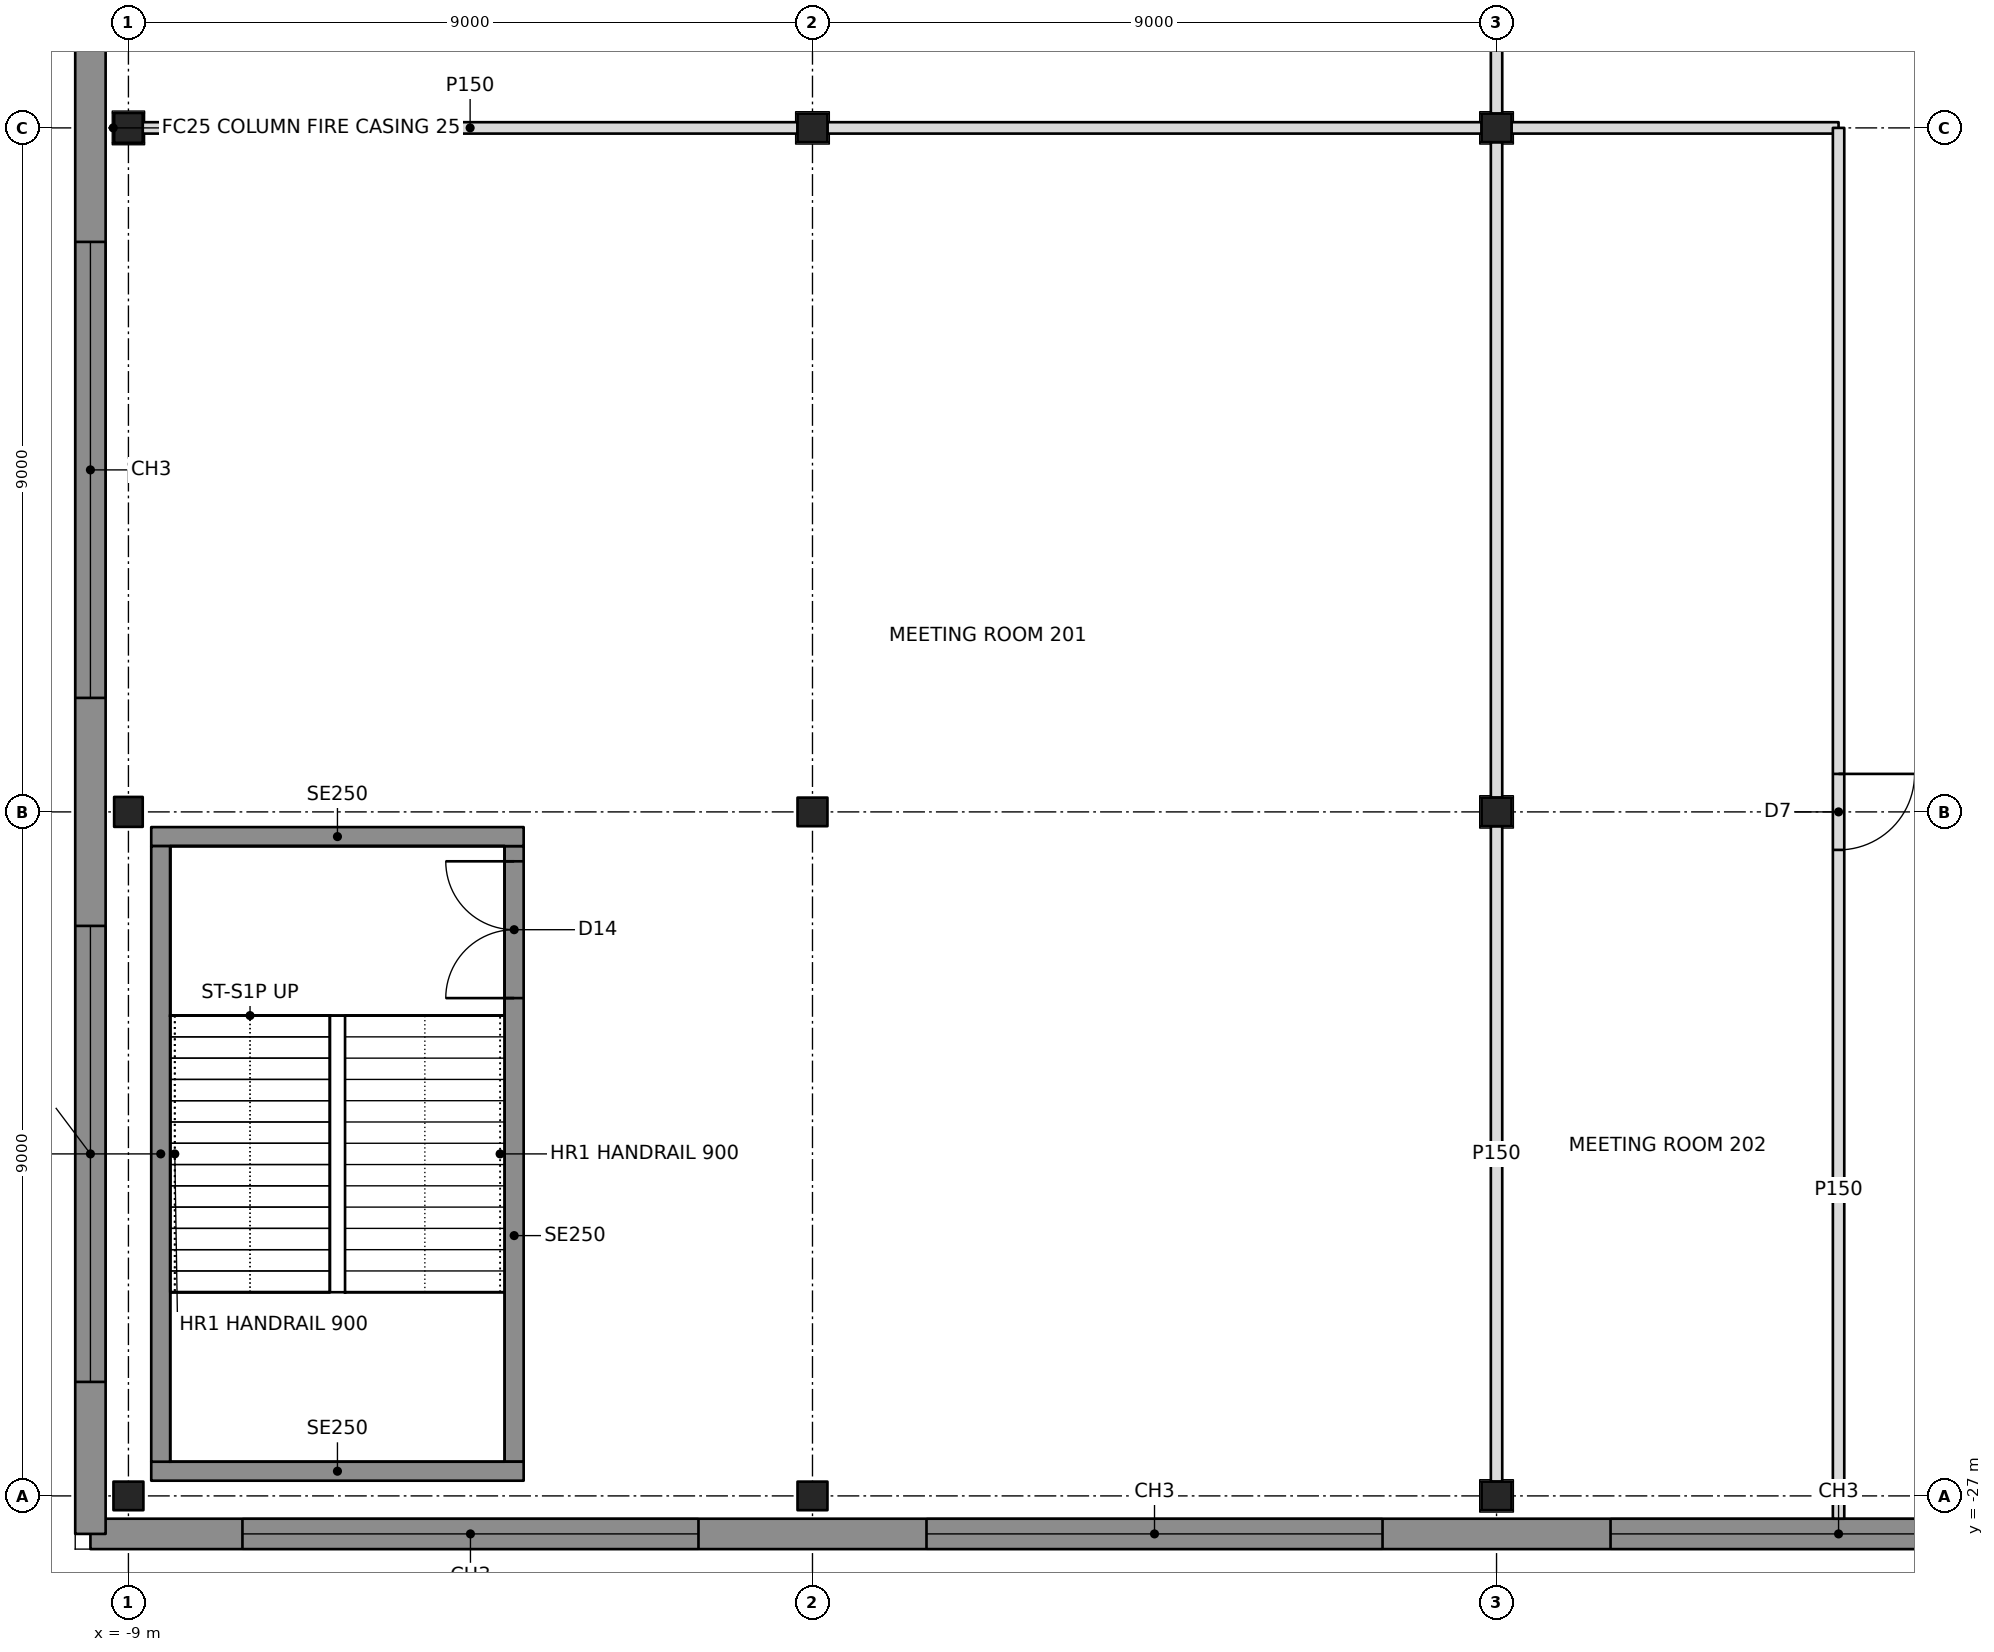
"""IFC4 building model, lengths in metres.
Left out: names, types, materials, properties, quantities, classifications, styles, units other than length and angle.
Written with IfcOpenShell. Run it as: python <this file> out.ifc"""

import sys

from ifc_helpers import new_model, si_unit, direction, frame, frame_2d, origin, origin_2d, place, context, subcontext, project, spatial, rectangle, i_section, extrude, element, fill, save


model = new_model("IFC4")
c1 = context("Model", 3, precision=1e-05, world=origin(), true_north=direction((0.0, 1.0)))
c2 = subcontext(c1, "Body", "Model", "MODEL_VIEW")
j1 = project(units=[si_unit("LENGTHUNIT", "METRE"), si_unit("PLANEANGLEUNIT", "RADIAN")], contexts=[c1])
p1 = place(None, origin())
s1 = spatial("IfcSite", under=j1, at=p1, CompositionType="ELEMENT")
p2 = place(p1, origin())
s2 = spatial("IfcBuilding", under=s1, at=p2, CompositionType="ELEMENT")
p3 = place(p2, frame((0.0, 0.0, 11.0)))
s3 = spatial("IfcBuildingStorey", under=s2, at=p3, CompositionType="ELEMENT", Elevation=11.0)
for number, where, z_axis, x_axis in (
    (1, (-9.0, -27.0, 0.0), (0.0, 0.0, 1.0), (1.0, 0.0, 0.0)),
    (2, (-9.0, -18.0, 0.0), (0.0, 0.0, 1.0), (0.0, 1.0, 0.0)),
    (3, (-9.0, -9.0, 0.0), (0.0, 0.0, 1.0), (0.0, 1.0, 0.0)),
    (4, (0.0, -27.0, 0.0), (0.0, 0.0, 1.0), (1.0, 0.0, 0.0)),
    (5, (0.0, -18.0, 0.0), (0.0, 0.0, 1.0), (1.0, 0.0, 0.0)),
    (6, (0.0, -9.0, 0.0), (0.0, 0.0, 1.0), (1.0, 0.0, 0.0)),
    (7, (9.0, -27.0, 0.0), (0.0, 0.0, 1.0), (1.0, 0.0, 0.0)),
    (8, (9.0, -18.0, 0.0), (0.0, 0.0, 1.0), (1.0, 0.0, 0.0)),
    (9, (9.0, -9.0, 0.0), (0.0, 0.0, 1.0), (1.0, 0.0, 0.0)),
):
    element("IfcColumn", number, at=place(p3, frame(where, z_axis=z_axis, x_axis=x_axis)), inside=s3, PredefinedType="COLUMN", context=c2, shape_type="SweptSolid", body=[
        extrude(i_section(OverallWidth=0.394, OverallDepth=0.376, WebThickness=0.017, FlangeThickness=0.028, at=origin_2d()), origin(), (0.0, 0.0, 1.0), 5.0),
    ])
p4 = place(p3, frame((-9.5, -27.5, 0.0), z_axis=(0.0, 0.0, 1.0), x_axis=(1.0, 0.0, 0.0)))
e10 = element("IfcWall", 10, at=p4, inside=s3, PredefinedType="SOLIDWALL", context=c2, shape_type="SweptSolid", body=[
    extrude(rectangle(XDim=73.0, YDim=0.4, at=frame_2d((36.5, 0.0))), origin(), (0.0, 0.0, 1.0), 4.75),
])
p5 = place(p4, frame((2.0, 0.0, 0.9)))
e11 = element("IfcOpeningElement", 11, at=p5, cuts=e10, PredefinedType="OPENING", context=c2, shape_type="SweptSolid", body=[
    extrude(rectangle(XDim=6.0, YDim=2.6, at=frame_2d((3.0, 1.3))), frame((0.0, 0.21, 0.0), z_axis=(0.0, -1.0, 0.0), x_axis=(1.0, 0.0, 0.0)), (0.0, 0.0, 1.0), 0.42),
])
p6 = place(p4, frame((11.0, 0.0, 0.9)))
e12 = element("IfcOpeningElement", 12, at=p6, cuts=e10, PredefinedType="OPENING", context=c2, shape_type="SweptSolid", body=[
    extrude(rectangle(XDim=6.0, YDim=2.6, at=frame_2d((3.0, 1.3))), frame((0.0, 0.21, 0.0), z_axis=(0.0, -1.0, 0.0), x_axis=(1.0, 0.0, 0.0)), (0.0, 0.0, 1.0), 0.42),
])
p7 = place(p4, frame((20.0, 0.0, 0.9)))
e13 = element("IfcOpeningElement", 13, at=p7, cuts=e10, PredefinedType="OPENING", context=c2, shape_type="SweptSolid", body=[
    extrude(rectangle(XDim=6.0, YDim=2.6, at=frame_2d((3.0, 1.3))), frame((0.0, 0.21, 0.0), z_axis=(0.0, -1.0, 0.0), x_axis=(1.0, 0.0, 0.0)), (0.0, 0.0, 1.0), 0.42),
])
p8 = place(p4, frame((29.0, 0.0, 0.9)))
e14 = element("IfcOpeningElement", 14, at=p8, cuts=e10, PredefinedType="OPENING", context=c2, shape_type="SweptSolid", body=[
    extrude(rectangle(XDim=6.0, YDim=2.6, at=frame_2d((3.0, 1.3))), frame((0.0, 0.21, 0.0), z_axis=(0.0, -1.0, 0.0), x_axis=(1.0, 0.0, 0.0)), (0.0, 0.0, 1.0), 0.42),
])
p9 = place(p4, frame((38.0, 0.0, 0.9)))
e15 = element("IfcOpeningElement", 15, at=p9, cuts=e10, PredefinedType="OPENING", context=c2, shape_type="SweptSolid", body=[
    extrude(rectangle(XDim=6.0, YDim=2.6, at=frame_2d((3.0, 1.3))), frame((0.0, 0.21, 0.0), z_axis=(0.0, -1.0, 0.0), x_axis=(1.0, 0.0, 0.0)), (0.0, 0.0, 1.0), 0.42),
])
p10 = place(p4, frame((47.0, 0.0, 0.9)))
e16 = element("IfcOpeningElement", 16, at=p10, cuts=e10, PredefinedType="OPENING", context=c2, shape_type="SweptSolid", body=[
    extrude(rectangle(XDim=6.0, YDim=2.6, at=frame_2d((3.0, 1.3))), frame((0.0, 0.21, 0.0), z_axis=(0.0, -1.0, 0.0), x_axis=(1.0, 0.0, 0.0)), (0.0, 0.0, 1.0), 0.42),
])
p11 = place(p4, frame((56.0, 0.0, 0.9)))
e17 = element("IfcOpeningElement", 17, at=p11, cuts=e10, PredefinedType="OPENING", context=c2, shape_type="SweptSolid", body=[
    extrude(rectangle(XDim=6.0, YDim=2.6, at=frame_2d((3.0, 1.3))), frame((0.0, 0.21, 0.0), z_axis=(0.0, -1.0, 0.0), x_axis=(1.0, 0.0, 0.0)), (0.0, 0.0, 1.0), 0.42),
])
p12 = place(p4, frame((65.0, 0.0, 0.9)))
e18 = element("IfcOpeningElement", 18, at=p12, cuts=e10, PredefinedType="OPENING", context=c2, shape_type="SweptSolid", body=[
    extrude(rectangle(XDim=6.0, YDim=2.6, at=frame_2d((3.0, 1.3))), frame((0.0, 0.21, 0.0), z_axis=(0.0, -1.0, 0.0), x_axis=(1.0, 0.0, 0.0)), (0.0, 0.0, 1.0), 0.42),
])
p13 = place(p3, frame((-9.5, 45.5, 0.0), z_axis=(0.0, 0.0, 1.0), x_axis=(0.0, -1.0, 0.0)))
e19 = element("IfcWall", 19, at=p13, inside=s3, PredefinedType="SOLIDWALL", context=c2, shape_type="SweptSolid", body=[
    extrude(rectangle(XDim=73.0, YDim=0.4, at=frame_2d((36.5, 0.0))), origin(), (0.0, 0.0, 1.0), 4.75),
])
p14 = place(p13, frame((2.0, 0.0, 0.9)))
e20 = element("IfcOpeningElement", 20, at=p14, cuts=e19, PredefinedType="OPENING", context=c2, shape_type="SweptSolid", body=[
    extrude(rectangle(XDim=6.0, YDim=2.6, at=frame_2d((3.0, 1.3))), frame((0.0, 0.21, 0.0), z_axis=(0.0, -1.0, 0.0), x_axis=(1.0, 0.0, 0.0)), (0.0, 0.0, 1.0), 0.42),
])
p15 = place(p13, frame((11.0, 0.0, 0.9)))
e21 = element("IfcOpeningElement", 21, at=p15, cuts=e19, PredefinedType="OPENING", context=c2, shape_type="SweptSolid", body=[
    extrude(rectangle(XDim=6.0, YDim=2.6, at=frame_2d((3.0, 1.3))), frame((0.0, 0.21, 0.0), z_axis=(0.0, -1.0, 0.0), x_axis=(1.0, 0.0, 0.0)), (0.0, 0.0, 1.0), 0.42),
])
p16 = place(p13, frame((20.0, 0.0, 0.9)))
e22 = element("IfcOpeningElement", 22, at=p16, cuts=e19, PredefinedType="OPENING", context=c2, shape_type="SweptSolid", body=[
    extrude(rectangle(XDim=6.0, YDim=2.6, at=frame_2d((3.0, 1.3))), frame((0.0, 0.21, 0.0), z_axis=(0.0, -1.0, 0.0), x_axis=(1.0, 0.0, 0.0)), (0.0, 0.0, 1.0), 0.42),
])
p17 = place(p13, frame((29.0, 0.0, 0.9)))
e23 = element("IfcOpeningElement", 23, at=p17, cuts=e19, PredefinedType="OPENING", context=c2, shape_type="SweptSolid", body=[
    extrude(rectangle(XDim=6.0, YDim=2.6, at=frame_2d((3.0, 1.3))), frame((0.0, 0.21, 0.0), z_axis=(0.0, -1.0, 0.0), x_axis=(1.0, 0.0, 0.0)), (0.0, 0.0, 1.0), 0.42),
])
p18 = place(p13, frame((38.0, 0.0, 0.9)))
e24 = element("IfcOpeningElement", 24, at=p18, cuts=e19, PredefinedType="OPENING", context=c2, shape_type="SweptSolid", body=[
    extrude(rectangle(XDim=6.0, YDim=2.6, at=frame_2d((3.0, 1.3))), frame((0.0, 0.21, 0.0), z_axis=(0.0, -1.0, 0.0), x_axis=(1.0, 0.0, 0.0)), (0.0, 0.0, 1.0), 0.42),
])
p19 = place(p13, frame((47.0, 0.0, 0.9)))
e25 = element("IfcOpeningElement", 25, at=p19, cuts=e19, PredefinedType="OPENING", context=c2, shape_type="SweptSolid", body=[
    extrude(rectangle(XDim=6.0, YDim=2.6, at=frame_2d((3.0, 1.3))), frame((0.0, 0.21, 0.0), z_axis=(0.0, -1.0, 0.0), x_axis=(1.0, 0.0, 0.0)), (0.0, 0.0, 1.0), 0.42),
])
p20 = place(p13, frame((56.0, 0.0, 0.9)))
e26 = element("IfcOpeningElement", 26, at=p20, cuts=e19, PredefinedType="OPENING", context=c2, shape_type="SweptSolid", body=[
    extrude(rectangle(XDim=6.0, YDim=2.6, at=frame_2d((3.0, 1.3))), frame((0.0, 0.21, 0.0), z_axis=(0.0, -1.0, 0.0), x_axis=(1.0, 0.0, 0.0)), (0.0, 0.0, 1.0), 0.42),
])
p21 = place(p13, frame((65.0, 0.0, 0.9)))
e27 = element("IfcOpeningElement", 27, at=p21, cuts=e19, PredefinedType="OPENING", context=c2, shape_type="SweptSolid", body=[
    extrude(rectangle(XDim=6.0, YDim=2.6, at=frame_2d((3.0, 1.3))), frame((0.0, 0.21, 0.0), z_axis=(0.0, -1.0, 0.0), x_axis=(1.0, 0.0, 0.0)), (0.0, 0.0, 1.0), 0.42),
])
p22 = place(p3, frame((-8.812, -9.0, 0.0), z_axis=(0.0, 0.0, 1.0), x_axis=(1.0, 0.0, 0.0)))
e28 = element("IfcWall", 28, at=p22, inside=s3, PredefinedType="PARTITIONING", context=c2, shape_type="SweptSolid", body=[
    extrude(rectangle(XDim=8.615, YDim=0.15, at=frame_2d((4.308, 0.0))), origin(), (0.0, 0.0, 1.0), 3.892),
])
p23 = place(p3, frame((0.197, -9.0, 0.0), z_axis=(0.0, 0.0, 1.0), x_axis=(1.0, 0.0, 0.0)))
e29 = element("IfcWall", 29, at=p23, inside=s3, PredefinedType="PARTITIONING", context=c2, shape_type="SweptSolid", body=[
    extrude(rectangle(XDim=8.606, YDim=0.15, at=frame_2d((4.303, 0.0))), origin(), (0.0, 0.0, 1.0), 3.892),
])
for number, where, z_axis, x_axis in (
    (30, (9.0, -9.188, 0.0), (0.0, 0.0, 1.0), (0.0, -1.0, 0.0)),
    (31, (9.0, -18.188, 0.0), (0.0, 0.0, 1.0), (0.0, -1.0, 0.0)),
):
    element("IfcWall", number, at=place(p3, frame(where, z_axis=z_axis, x_axis=x_axis)), inside=s3, PredefinedType="PARTITIONING", context=c2, shape_type="SweptSolid", body=[
        extrude(rectangle(XDim=8.624, YDim=0.15, at=frame_2d((4.312, 0.0))), origin(), (0.0, 0.0, 1.0), 3.892),
    ])
p24 = place(p3, frame((9.197, -9.0, 0.0), z_axis=(0.0, 0.0, 1.0), x_axis=(1.0, 0.0, 0.0)))
e32 = element("IfcWall", 32, at=p24, inside=s3, PredefinedType="PARTITIONING", context=c2, shape_type="SweptSolid", body=[
    extrude(rectangle(XDim=4.303, YDim=0.15, at=frame_2d((2.152, 0.0))), origin(), (0.0, 0.0, 1.0), 3.892),
])
p25 = place(p3, frame((9.0, -0.4, 0.0), z_axis=(0.0, 0.0, 1.0), x_axis=(0.0, -1.0, 0.0)))
e33 = element("IfcWall", 33, at=p25, inside=s3, PredefinedType="PARTITIONING", context=c2, shape_type="SweptSolid", body=[
    extrude(rectangle(XDim=8.412, YDim=0.15, at=frame_2d((4.206, 0.0))), origin(), (0.0, 0.0, 1.0), 3.892),
])
p26 = place(p3, frame((13.5, -9.0, 0.0), z_axis=(0.0, 0.0, 1.0), x_axis=(0.0, -1.0, 0.0)))
e34 = element("IfcWall", 34, at=p26, inside=s3, PredefinedType="PARTITIONING", context=c2, shape_type="SweptSolid", body=[
    extrude(rectangle(XDim=18.3, YDim=0.15, at=frame_2d((9.15, 0.0))), origin(), (0.0, 0.0, 1.0), 3.891),
])
p27 = place(p26, frame((8.5, 0.0, 0.0)))
e35 = element("IfcOpeningElement", 35, at=p27, cuts=e34, PredefinedType="OPENING", context=c2, shape_type="SweptSolid", body=[
    extrude(rectangle(XDim=1.0, YDim=2.1, at=frame_2d((0.5, 1.05))), frame((0.0, 0.085, 0.0), z_axis=(0.0, -1.0, 0.0), x_axis=(1.0, 0.0, 0.0)), (0.0, 0.0, 1.0), 0.17),
])
for number, where, z_axis, x_axis in (
    (36, (-8.7, -26.675, 0.0), (0.0, 0.0, 1.0), (1.0, 0.0, 0.0)),
    (37, (-8.7, -18.325, 0.0), (0.0, 0.0, 1.0), (1.0, 0.0, 0.0)),
):
    element("IfcWall", number, at=place(p3, frame(where, z_axis=z_axis, x_axis=x_axis)), inside=s3, PredefinedType="SOLIDWALL", context=c2, shape_type="SweptSolid", body=[
        extrude(rectangle(XDim=4.9, YDim=0.25, at=frame_2d((2.45, 0.0))), origin(), (0.0, 0.0, 1.0), 4.75),
    ])
p28 = place(p3, frame((-8.575, -26.55, 0.0), z_axis=(0.0, 0.0, 1.0), x_axis=(0.0, 1.0, 0.0)))
e38 = element("IfcWall", 38, at=p28, inside=s3, PredefinedType="SOLIDWALL", context=c2, shape_type="SweptSolid", body=[
    extrude(rectangle(XDim=8.1, YDim=0.25, at=frame_2d((4.05, 0.0))), origin(), (0.0, 0.0, 1.0), 4.75),
])
p29 = place(p3, frame((-3.925, -26.55, 0.0), z_axis=(0.0, 0.0, 1.0), x_axis=(0.0, 1.0, 0.0)))
e39 = element("IfcWall", 39, at=p29, inside=s3, PredefinedType="SOLIDWALL", context=c2, shape_type="SweptSolid", body=[
    extrude(rectangle(XDim=8.1, YDim=0.25, at=frame_2d((4.05, 0.0))), origin(), (0.0, 0.0, 1.0), 4.75),
])
p30 = place(p29, frame((6.1, 0.0, 0.0)))
e40 = element("IfcOpeningElement", 40, at=p30, cuts=e39, PredefinedType="OPENING", context=c2, shape_type="SweptSolid", body=[
    extrude(rectangle(XDim=1.8, YDim=2.1, at=frame_2d((0.9, 1.05))), frame((0.0, 0.135, 0.0), z_axis=(0.0, -1.0, 0.0), x_axis=(1.0, 0.0, 0.0)), (0.0, 0.0, 1.0), 0.27),
])
p31 = place(p5, origin())
e41 = element("IfcWindow", 41, at=p31, inside=s3, PartitioningType="TRIPLE_PANEL_VERTICAL", PredefinedType="WINDOW", context=c2, shape_type="SweptSolid", body=[
    extrude(rectangle(XDim=6.0, YDim=2.6, at=frame_2d((3.0, 1.3))), frame((0.0, 0.03, 0.0), z_axis=(0.0, -1.0, 0.0), x_axis=(1.0, 0.0, 0.0)), (0.0, 0.0, 1.0), 0.06),
])
fill(e11, e41)
p32 = place(p6, origin())
e42 = element("IfcWindow", 42, at=p32, inside=s3, PartitioningType="TRIPLE_PANEL_VERTICAL", PredefinedType="WINDOW", context=c2, shape_type="SweptSolid", body=[
    extrude(rectangle(XDim=6.0, YDim=2.6, at=frame_2d((3.0, 1.3))), frame((0.0, 0.03, 0.0), z_axis=(0.0, -1.0, 0.0), x_axis=(1.0, 0.0, 0.0)), (0.0, 0.0, 1.0), 0.06),
])
fill(e12, e42)
p33 = place(p7, origin())
e43 = element("IfcWindow", 43, at=p33, inside=s3, PartitioningType="TRIPLE_PANEL_VERTICAL", PredefinedType="WINDOW", context=c2, shape_type="SweptSolid", body=[
    extrude(rectangle(XDim=6.0, YDim=2.6, at=frame_2d((3.0, 1.3))), frame((0.0, 0.03, 0.0), z_axis=(0.0, -1.0, 0.0), x_axis=(1.0, 0.0, 0.0)), (0.0, 0.0, 1.0), 0.06),
])
fill(e13, e43)
p34 = place(p20, origin())
e44 = element("IfcWindow", 44, at=p34, inside=s3, PartitioningType="TRIPLE_PANEL_VERTICAL", PredefinedType="WINDOW", context=c2, shape_type="SweptSolid", body=[
    extrude(rectangle(XDim=6.0, YDim=2.6, at=frame_2d((3.0, 1.3))), frame((0.0, 0.03, 0.0), z_axis=(0.0, -1.0, 0.0), x_axis=(1.0, 0.0, 0.0)), (0.0, 0.0, 1.0), 0.06),
])
fill(e26, e44)
p35 = place(p21, origin())
e45 = element("IfcWindow", 45, at=p35, inside=s3, PartitioningType="TRIPLE_PANEL_VERTICAL", PredefinedType="WINDOW", context=c2, shape_type="SweptSolid", body=[
    extrude(rectangle(XDim=6.0, YDim=2.6, at=frame_2d((3.0, 1.3))), frame((0.0, 0.03, 0.0), z_axis=(0.0, -1.0, 0.0), x_axis=(1.0, 0.0, 0.0)), (0.0, 0.0, 1.0), 0.06),
])
fill(e27, e45)
p36 = place(p27, origin())
e46 = element("IfcDoor", 46, at=p36, inside=s3, OperationType="SINGLE_SWING_LEFT", PredefinedType="DOOR", context=c2, shape_type="SweptSolid", body=[
    extrude(rectangle(XDim=1.0, YDim=2.1, at=frame_2d((0.5, 1.05))), frame((0.0, 0.025, 0.0), z_axis=(0.0, -1.0, 0.0), x_axis=(1.0, 0.0, 0.0)), (0.0, 0.0, 1.0), 0.05),
])
fill(e35, e46)
p37 = place(p30, origin())
e47 = element("IfcDoor", 47, at=p37, inside=s3, OperationType="DOUBLE_DOOR_SINGLE_SWING", PredefinedType="DOOR", context=c2, shape_type="SweptSolid", body=[
    extrude(rectangle(XDim=1.8, YDim=2.1, at=frame_2d((0.9, 1.05))), frame((0.0, 0.025, 0.0), z_axis=(0.0, -1.0, 0.0), x_axis=(1.0, 0.0, 0.0)), (0.0, 0.0, 1.0), 0.05),
])
fill(e40, e47)
save(model, sys.argv[1])
